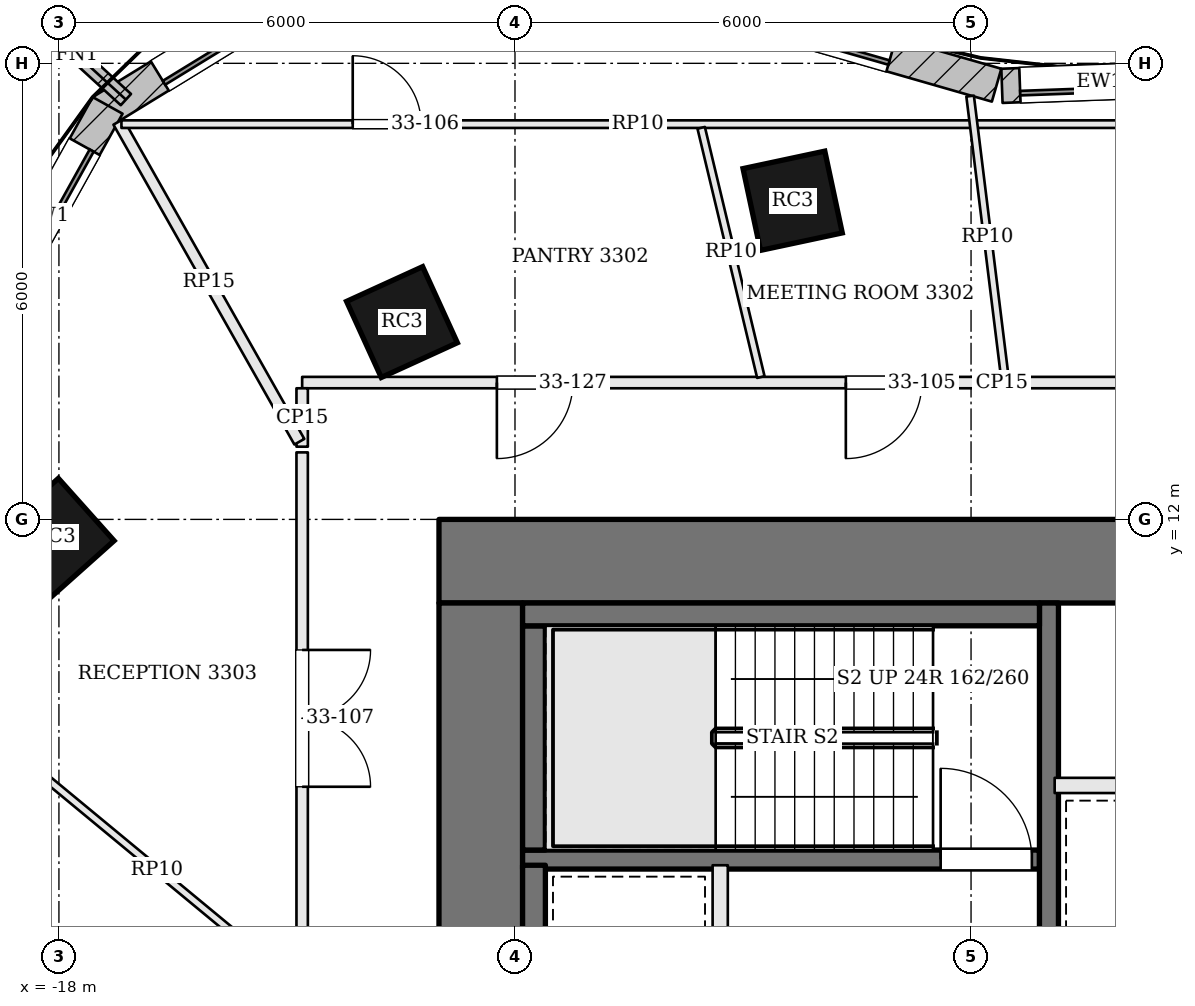
"""IFC4 building model, lengths in metres.
Left out: names, types, materials, properties, quantities, classifications, styles, units other than length and angle.
Written with IfcOpenShell. Run it as: python <this file> out.ifc"""

import sys

from ifc_helpers import new_model, si_unit, direction, frame, frame_2d, origin, origin_2d, place, context, subcontext, project, spatial, rectangle, extrude, element, fill, save


model = new_model("IFC4")
c1 = context("Model", 3, precision=1e-05, world=origin(), true_north=direction((0.0, 1.0)))
c2 = subcontext(c1, "Body", "Model", "MODEL_VIEW")
j1 = project(units=[si_unit("LENGTHUNIT", "METRE"), si_unit("PLANEANGLEUNIT", "RADIAN")], contexts=[c1])
p1 = place(None, origin())
s1 = spatial("IfcSite", under=j1, at=p1, CompositionType="ELEMENT")
p2 = place(p1, origin())
s2 = spatial("IfcBuilding", under=s1, at=p2, CompositionType="ELEMENT")
p3 = place(p2, frame((0.0, 0.0, 138.3)))
s3 = spatial("IfcBuildingStorey", under=s2, at=p3, CompositionType="ELEMENT", Elevation=138.3)
p4 = place(p3, frame((-13.0, 11.45, 0.0), z_axis=(0.0, 0.0, 1.0), x_axis=(1.0, 0.0, 0.0)))
e1 = element("IfcWall", 1, at=p4, inside=s3, PredefinedType="SHEAR", context=c2, shape_type="SweptSolid", body=[
    extrude(rectangle(XDim=26.0, YDim=1.1, at=frame_2d((13.0, 0.0))), origin(), (0.0, 0.0, 1.0), 3.9),
])
p5 = place(p4, frame((8.975, 0.0, 0.0)))
e2 = element("IfcOpeningElement", 2, at=p5, cuts=e1, PredefinedType="OPENING", context=c2, shape_type="SweptSolid", body=[
    extrude(rectangle(XDim=0.7, YDim=2.1, at=frame_2d((0.35, 1.05))), frame((0.0, 0.56, 0.0), z_axis=(0.0, -1.0, 0.0), x_axis=(1.0, 0.0, 0.0)), (0.0, 0.0, 1.0), 1.12),
])
p6 = place(p4, frame((11.425, 0.0, 0.0)))
e3 = element("IfcOpeningElement", 3, at=p6, cuts=e1, PredefinedType="OPENING", context=c2, shape_type="SweptSolid", body=[
    extrude(rectangle(XDim=0.7, YDim=2.1, at=frame_2d((0.35, 1.05))), frame((0.0, 0.56, 0.0), z_axis=(0.0, -1.0, 0.0), x_axis=(1.0, 0.0, 0.0)), (0.0, 0.0, 1.0), 1.12),
])
p7 = place(p4, frame((13.725, 0.0, 0.0)))
e4 = element("IfcOpeningElement", 4, at=p7, cuts=e1, PredefinedType="OPENING", context=c2, shape_type="SweptSolid", body=[
    extrude(rectangle(XDim=1.0, YDim=2.1, at=frame_2d((0.5, 1.05))), frame((0.0, 0.56, 0.0), z_axis=(0.0, -1.0, 0.0), x_axis=(1.0, 0.0, 0.0)), (0.0, 0.0, 1.0), 1.12),
])
p8 = place(p4, frame((16.175, 0.0, 0.0)))
e5 = element("IfcOpeningElement", 5, at=p8, cuts=e1, PredefinedType="OPENING", context=c2, shape_type="SweptSolid", body=[
    extrude(rectangle(XDim=1.0, YDim=2.1, at=frame_2d((0.5, 1.05))), frame((0.0, 0.56, 0.0), z_axis=(0.0, -1.0, 0.0), x_axis=(1.0, 0.0, 0.0)), (0.0, 0.0, 1.0), 1.12),
])
p9 = place(p3, frame((-12.45, -1.9, 0.0), z_axis=(0.0, 0.0, 1.0), x_axis=(0.0, 1.0, 0.0)))
e6 = element("IfcWall", 6, at=p9, inside=s3, PredefinedType="SHEAR", context=c2, shape_type="SweptSolid", body=[
    extrude(rectangle(XDim=12.8, YDim=1.1, at=frame_2d((6.4, 0.0))), origin(), (0.0, 0.0, 1.0), 3.9),
])
p10 = place(p9, frame((3.9, 0.0, 0.0)))
e7 = element("IfcOpeningElement", 7, at=p10, cuts=e6, PredefinedType="OPENING", context=c2, shape_type="SweptSolid", body=[
    extrude(rectangle(XDim=1.8, YDim=2.1, at=frame_2d((0.9, 1.05))), frame((0.0, 0.56, 0.0), z_axis=(0.0, -1.0, 0.0), x_axis=(1.0, 0.0, 0.0)), (0.0, 0.0, 1.0), 1.12),
])
for number, where, z_axis, x_axis in (
    (8, (-8.347, 16.192, 0.0), (0.0, 0.0, 1.0), (-0.978, -0.209, 0.0)),
    (9, (-13.487, 14.596, 0.0), (0.0, 0.0, 1.0), (-0.91, -0.415, 0.0)),
    (10, (-18.051, 11.763, 0.0), (0.0, 0.0, 1.0), (-0.746, -0.666, 0.0)),
):
    element("IfcColumn", number, at=place(p3, frame(where, z_axis=z_axis, x_axis=x_axis)), inside=s3, PredefinedType="COLUMN", context=c2, shape_type="SweptSolid", body=[
        extrude(rectangle(XDim=1.1, YDim=1.1, at=origin_2d()), origin(), (0.0, 0.0, 1.0), 3.9),
    ])
p11 = place(p3, frame((-3.022, 17.798, 0.0), z_axis=(0.0, 0.0, 1.0), x_axis=(-0.999339560591, -0.036337895349, 0.0)))
e11 = element("IfcWall", 11, at=p11, inside=s3, PredefinedType="SOLIDWALL", context=c2, shape_type="SweptSolid", body=[
    extrude(rectangle(XDim=2.573, YDim=0.45, at=frame_2d((1.287, 0.0))), origin(), (0.0, 0.0, 1.0), 3.7),
])
p12 = place(p11, frame((0.237, 0.0, 0.9)))
e12 = element("IfcOpeningElement", 12, at=p12, cuts=e11, PredefinedType="OPENING", context=c2, shape_type="SweptSolid", body=[
    extrude(rectangle(XDim=2.1, YDim=2.3, at=frame_2d((1.05, 1.15))), frame((0.0, 0.235, 0.0), z_axis=(0.0, -1.0, 0.0), x_axis=(1.0, 0.0, 0.0)), (0.0, 0.0, 1.0), 0.47),
])
p13 = place(p3, frame((-5.664, 17.713, 0.0), z_axis=(0.0, 0.0, 1.0), x_axis=(-0.961108031684, 0.276172684083, 0.0)))
e13 = element("IfcWall", 13, at=p13, inside=s3, PredefinedType="SOLIDWALL", context=c2, shape_type="SweptSolid", body=[
    extrude(rectangle(XDim=4.686, YDim=0.45, at=frame_2d((2.343, 0.0))), origin(), (0.0, 0.0, 1.0), 3.7),
])
p14 = place(p13, frame((1.443, 0.0, 0.9)))
e14 = element("IfcOpeningElement", 14, at=p14, cuts=e13, PredefinedType="OPENING", context=c2, shape_type="SweptSolid", body=[
    extrude(rectangle(XDim=1.8, YDim=2.3, at=frame_2d((0.9, 1.15))), frame((0.0, 0.235, 0.0), z_axis=(0.0, -1.0, 0.0), x_axis=(1.0, 0.0, 0.0)), (0.0, 0.0, 1.0), 0.47),
])
p15 = place(p3, frame((-14.116, 19.4, 0.0), z_axis=(0.0, 0.0, 1.0), x_axis=(-0.852622865325, -0.522526793117, 0.0)))
e15 = element("IfcWall", 15, at=p15, inside=s3, PredefinedType="SOLIDWALL", context=c2, shape_type="SweptSolid", body=[
    extrude(rectangle(XDim=3.896, YDim=0.45, at=frame_2d((1.948, 0.0))), origin(), (0.0, 0.0, 1.0), 3.7),
])
p16 = place(p15, frame((0.898, 0.0, 0.9)))
e16 = element("IfcOpeningElement", 16, at=p16, cuts=e15, PredefinedType="OPENING", context=c2, shape_type="SweptSolid", body=[
    extrude(rectangle(XDim=2.1, YDim=2.3, at=frame_2d((1.05, 1.15))), frame((0.0, 0.235, 0.0), z_axis=(0.0, -1.0, 0.0), x_axis=(1.0, 0.0, 0.0)), (0.0, 0.0, 1.0), 0.47),
])
p17 = place(p3, frame((-17.359, 17.447, 0.0), z_axis=(0.0, 0.0, 1.0), x_axis=(-0.485618126214, -0.874171056197, 0.0)))
e17 = element("IfcWall", 17, at=p17, inside=s3, PredefinedType="SOLIDWALL", context=c2, shape_type="SweptSolid", body=[
    extrude(rectangle(XDim=3.343, YDim=0.45, at=frame_2d((1.671, 0.0))), origin(), (0.0, 0.0, 1.0), 3.7),
])
p18 = place(p17, frame((0.621, 0.0, 0.9)))
e18 = element("IfcOpeningElement", 18, at=p18, cuts=e17, PredefinedType="OPENING", context=c2, shape_type="SweptSolid", body=[
    extrude(rectangle(XDim=2.1, YDim=2.3, at=frame_2d((1.05, 1.15))), frame((0.0, 0.235, 0.0), z_axis=(0.0, -1.0, 0.0), x_axis=(1.0, 0.0, 0.0)), (0.0, 0.0, 1.0), 0.47),
])
p19 = place(p3, frame((-17.119, 17.523, 0.0), z_axis=(0.0, 0.0, 1.0), x_axis=(-0.737866019047, 0.674947211221, 0.0)))
e19 = element("IfcWall", 19, at=p19, inside=s3, PredefinedType="SOLIDWALL", context=c2, shape_type="SweptSolid", body=[
    extrude(rectangle(XDim=1.75, YDim=0.2, at=frame_2d((0.875, 0.0))), origin(), (0.0, 0.0, 1.0), 3.7),
])
p20 = place(p3, frame((-11.9, 7.525, 0.0), z_axis=(0.0, 0.0, 1.0), x_axis=(1.0, 0.0, 0.0)))
e20 = element("IfcWall", 20, at=p20, inside=s3, PredefinedType="SOLIDWALL", context=c2, shape_type="SweptSolid", body=[
    extrude(rectangle(XDim=6.8, YDim=0.25, at=frame_2d((3.4, 0.0))), origin(), (0.0, 0.0, 1.0), 3.7),
])
p21 = place(p20, frame((5.5, 0.0, 0.0)))
e21 = element("IfcOpeningElement", 21, at=p21, cuts=e20, PredefinedType="OPENING", context=c2, shape_type="SweptSolid", body=[
    extrude(rectangle(XDim=1.2, YDim=2.1, at=frame_2d((0.6, 1.05))), frame((0.0, 0.135, 0.0), z_axis=(0.0, -1.0, 0.0), x_axis=(1.0, 0.0, 0.0)), (0.0, 0.0, 1.0), 0.27),
])
p22 = place(p3, frame((-9.3, 4.45, 0.0), z_axis=(0.0, 0.0, 1.0), x_axis=(0.0, 1.0, 0.0)))
e22 = element("IfcWall", 22, at=p22, inside=s3, PredefinedType="SOLIDWALL", context=c2, shape_type="SweptSolid", body=[
    extrude(rectangle(XDim=3.0, YDim=0.2, at=frame_2d((1.5, 0.0))), origin(), (0.0, 0.0, 1.0), 3.7),
])
p23 = place(p3, frame((-4.975, -1.9, 0.0), z_axis=(0.0, 0.0, 1.0), x_axis=(0.0, 1.0, 0.0)))
e23 = element("IfcWall", 23, at=p23, inside=s3, PredefinedType="SOLIDWALL", context=c2, shape_type="SweptSolid", body=[
    extrude(rectangle(XDim=12.8, YDim=0.25, at=frame_2d((6.4, 0.0))), origin(), (0.0, 0.0, 1.0), 3.7),
])
p24 = place(p23, frame((4.95, 0.0, 0.0)))
e24 = element("IfcOpeningElement", 24, at=p24, cuts=e23, PredefinedType="OPENING", context=c2, shape_type="SweptSolid", body=[
    extrude(rectangle(XDim=1.2, YDim=2.1, at=frame_2d((0.6, 1.05))), frame((0.0, 0.135, 0.0), z_axis=(0.0, -1.0, 0.0), x_axis=(1.0, 0.0, 0.0)), (0.0, 0.0, 1.0), 0.27),
])
p25 = place(p3, frame((-11.75, 4.45, 0.0), z_axis=(0.0, 0.0, 1.0), x_axis=(0.0, 1.0, 0.0)))
e25 = element("IfcWall", 25, at=p25, inside=s3, PredefinedType="SOLIDWALL", context=c2, shape_type="SweptSolid", body=[
    extrude(rectangle(XDim=3.0, YDim=0.3, at=frame_2d((1.5, 0.0))), origin(), (0.0, 0.0, 1.0), 3.7),
])
p26 = place(p3, frame((-11.75, 7.65, 0.0), z_axis=(0.0, 0.0, 1.0), x_axis=(0.0, 1.0, 0.0)))
e26 = element("IfcWall", 26, at=p26, inside=s3, PredefinedType="SOLIDWALL", context=c2, shape_type="SweptSolid", body=[
    extrude(rectangle(XDim=2.95, YDim=0.3, at=frame_2d((1.475, 0.0))), origin(), (0.0, 0.0, 1.0), 3.7),
])
p27 = place(p3, frame((-11.9, 10.75, 0.0), z_axis=(0.0, 0.0, 1.0), x_axis=(1.0, 0.0, 0.0)))
e27 = element("IfcWall", 27, at=p27, inside=s3, PredefinedType="SOLIDWALL", context=c2, shape_type="SweptSolid", body=[
    extrude(rectangle(XDim=6.8, YDim=0.3, at=frame_2d((3.4, 0.0))), origin(), (0.0, 0.0, 1.0), 3.7),
])
p28 = place(p3, frame((-4.9, 8.5, 0.0), z_axis=(0.0, 0.0, 1.0), x_axis=(1.0, 0.0, 0.0)))
e28 = element("IfcWall", 28, at=p28, inside=s3, PredefinedType="SOLIDWALL", context=c2, shape_type="SweptSolid", body=[
    extrude(rectangle(XDim=9.8, YDim=0.2, at=frame_2d((4.9, 0.0))), origin(), (0.0, 0.0, 1.0), 3.7),
])
p29 = place(p3, frame((3.012, 13.8, 0.0), z_axis=(0.0, 0.0, 1.0), x_axis=(-1.0, 0.0, 0.0)))
e29 = element("IfcWall", 29, at=p29, inside=s3, PredefinedType="PARTITIONING", context=c2, shape_type="SweptSolid", body=[
    extrude(rectangle(XDim=17.812, YDim=0.15, at=frame_2d((8.906, 0.0))), origin(), (0.0, 0.0, 1.0), 3.198),
])
p30 = place(p29, frame((3.342, 0.0, 0.0)))
e30 = element("IfcOpeningElement", 30, at=p30, cuts=e29, PredefinedType="OPENING", context=c2, shape_type="SweptSolid", body=[
    extrude(rectangle(XDim=1.8, YDim=2.1, at=frame_2d((0.9, 1.05))), frame((0.0, 0.085, 0.0), z_axis=(0.0, -1.0, 0.0), x_axis=(1.0, 0.0, 0.0)), (0.0, 0.0, 1.0), 0.17),
])
p31 = place(p29, frame((9.659, 0.0, 0.0)))
e31 = element("IfcOpeningElement", 31, at=p31, cuts=e29, PredefinedType="OPENING", context=c2, shape_type="SweptSolid", body=[
    extrude(rectangle(XDim=1.0, YDim=2.4, at=frame_2d((0.5, 1.2))), frame((0.0, 0.085, 0.0), z_axis=(0.0, -1.0, 0.0), x_axis=(1.0, 0.0, 0.0)), (0.0, 0.0, 1.0), 0.17),
])
p32 = place(p29, frame((14.25, 0.0, 0.0)))
e32 = element("IfcOpeningElement", 32, at=p32, cuts=e29, PredefinedType="OPENING", context=c2, shape_type="SweptSolid", body=[
    extrude(rectangle(XDim=1.0, YDim=2.1, at=frame_2d((0.5, 1.05))), frame((0.0, 0.085, 0.0), z_axis=(0.0, -1.0, 0.0), x_axis=(1.0, 0.0, 0.0)), (0.0, 0.0, 1.0), 0.17),
])
p33 = place(p3, frame((-14.8, 13.725, 0.0), z_axis=(0.0, 0.0, 1.0), x_axis=(0.0, -1.0, 0.0)))
e33 = element("IfcWall", 33, at=p33, inside=s3, PredefinedType="PARTITIONING", context=c2, shape_type="SweptSolid", body=[
    extrude(rectangle(XDim=0.769, YDim=0.15, at=frame_2d((0.384, 0.0))), origin(), (0.0, 0.0, 1.0), 3.198),
])
p34 = place(p3, frame((-17.218, 17.23, 0.0), z_axis=(0.0, 0.0, 1.0), x_axis=(0.492436580725, -0.870348329098, 0.0)))
e34 = element("IfcWall", 34, at=p34, inside=s3, PredefinedType="PARTITIONING", context=c2, shape_type="SweptSolid", body=[
    extrude(rectangle(XDim=4.835, YDim=0.15, at=frame_2d((2.417, 0.0))), origin(), (0.0, 0.0, 1.0), 3.198),
])
p35 = place(p3, frame((-14.8, 12.882, 0.0), z_axis=(0.0, 0.0, 1.0), x_axis=(0.0, -1.0, 0.0)))
e35 = element("IfcWall", 35, at=p35, inside=s3, PredefinedType="PARTITIONING", context=c2, shape_type="SweptSolid", body=[
    extrude(rectangle(XDim=16.652, YDim=0.15, at=frame_2d((8.326, 0.0))), origin(), (0.0, 0.0, 1.0), 3.198),
])
p36 = place(p35, frame((2.599, 0.0, 0.0)))
e36 = element("IfcOpeningElement", 36, at=p36, cuts=e35, PredefinedType="OPENING", context=c2, shape_type="SweptSolid", body=[
    extrude(rectangle(XDim=1.8, YDim=2.1, at=frame_2d((0.9, 1.05))), frame((0.0, 0.085, 0.0), z_axis=(0.0, -1.0, 0.0), x_axis=(1.0, 0.0, 0.0)), (0.0, 0.0, 1.0), 0.17),
])
p37 = place(p35, frame((9.456, 0.0, 0.0)))
e37 = element("IfcOpeningElement", 37, at=p37, cuts=e35, PredefinedType="OPENING", context=c2, shape_type="SweptSolid", body=[
    extrude(rectangle(XDim=1.0, YDim=2.4, at=frame_2d((0.5, 1.2))), frame((0.0, 0.085, 0.0), z_axis=(0.0, -1.0, 0.0), x_axis=(1.0, 0.0, 0.0)), (0.0, 0.0, 1.0), 0.17),
])
p38 = place(p35, frame((14.15, 0.0, 0.0)))
e38 = element("IfcOpeningElement", 38, at=p38, cuts=e35, PredefinedType="OPENING", context=c2, shape_type="SweptSolid", body=[
    extrude(rectangle(XDim=1.0, YDim=2.1, at=frame_2d((0.5, 1.05))), frame((0.0, 0.085, 0.0), z_axis=(0.0, -1.0, 0.0), x_axis=(1.0, 0.0, 0.0)), (0.0, 0.0, 1.0), 0.17),
])
p39 = place(p3, frame((-17.178, 17.2, 0.0), z_axis=(0.0, 0.0, 1.0), x_axis=(1.0, 0.0, 0.0)))
e39 = element("IfcWall", 39, at=p39, inside=s3, PredefinedType="PARTITIONING", context=c2, shape_type="SweptSolid", body=[
    extrude(rectangle(XDim=13.585, YDim=0.1, at=frame_2d((6.792, 0.0))), origin(), (0.0, 0.0, 1.0), 3.184),
])
p40 = place(p39, frame((3.043, 0.0, 0.0)))
e40 = element("IfcOpeningElement", 40, at=p40, cuts=e39, PredefinedType="OPENING", context=c2, shape_type="SweptSolid", body=[
    extrude(rectangle(XDim=0.9, YDim=2.1, at=frame_2d((0.45, 1.05))), frame((0.0, 0.06, 0.0), z_axis=(0.0, -1.0, 0.0), x_axis=(1.0, 0.0, 0.0)), (0.0, 0.0, 1.0), 0.12),
])
p41 = place(p3, frame((-5.556, 13.875, 0.0), z_axis=(0.0, 0.0, 1.0), x_axis=(-0.122573624649, 0.99245942312, 0.0)))
e41 = element("IfcWall", 41, at=p41, inside=s3, PredefinedType="PARTITIONING", context=c2, shape_type="SweptSolid", body=[
    extrude(rectangle(XDim=3.723, YDim=0.1, at=frame_2d((1.861, 0.0))), origin(), (0.0, 0.0, 1.0), 3.184),
])
p42 = place(p3, frame((-8.765, 13.873, 0.0), z_axis=(0.0, 0.0, 1.0), x_axis=(-0.232827854215, 0.972517963999, 0.0)))
e42 = element("IfcWall", 42, at=p42, inside=s3, PredefinedType="PARTITIONING", context=c2, shape_type="SweptSolid", body=[
    extrude(rectangle(XDim=3.371, YDim=0.1, at=frame_2d((1.686, 0.0))), origin(), (0.0, 0.0, 1.0), 3.184),
])
p43 = place(p3, frame((-14.858, 5.857, 0.0), z_axis=(0.0, 0.0, 1.0), x_axis=(-0.770605931108, 0.637311932213, 0.0)))
e43 = element("IfcWall", 43, at=p43, inside=s3, PredefinedType="PARTITIONING", context=c2, shape_type="SweptSolid", body=[
    extrude(rectangle(XDim=4.806, YDim=0.1, at=frame_2d((2.403, 0.0))), origin(), (0.0, 0.0, 1.0), 3.184),
])
p44 = place(p12, origin())
e44 = element("IfcWindow", 44, at=p44, inside=s3, PartitioningType="SINGLE_PANEL", PredefinedType="WINDOW", context=c2, shape_type="SweptSolid", body=[
    extrude(rectangle(XDim=2.1, YDim=2.3, at=frame_2d((1.05, 1.15))), frame((0.0, 0.135, 0.0), z_axis=(0.0, -1.0, 0.0), x_axis=(1.0, 0.0, 0.0)), (0.0, 0.0, 1.0), 0.06),
])
fill(e12, e44)
p45 = place(p14, origin())
e45 = element("IfcWindow", 45, at=p45, inside=s3, PartitioningType="SINGLE_PANEL", PredefinedType="WINDOW", context=c2, shape_type="SweptSolid", body=[
    extrude(rectangle(XDim=1.8, YDim=2.3, at=frame_2d((0.9, 1.15))), frame((0.0, 0.135, 0.0), z_axis=(0.0, -1.0, 0.0), x_axis=(1.0, 0.0, 0.0)), (0.0, 0.0, 1.0), 0.06),
])
fill(e14, e45)
p46 = place(p16, origin())
e46 = element("IfcWindow", 46, at=p46, inside=s3, PartitioningType="SINGLE_PANEL", PredefinedType="WINDOW", context=c2, shape_type="SweptSolid", body=[
    extrude(rectangle(XDim=2.1, YDim=2.3, at=frame_2d((1.05, 1.15))), frame((0.0, 0.135, 0.0), z_axis=(0.0, -1.0, 0.0), x_axis=(1.0, 0.0, 0.0)), (0.0, 0.0, 1.0), 0.06),
])
fill(e16, e46)
p47 = place(p18, origin())
e47 = element("IfcWindow", 47, at=p47, inside=s3, PartitioningType="SINGLE_PANEL", PredefinedType="WINDOW", context=c2, shape_type="SweptSolid", body=[
    extrude(rectangle(XDim=2.1, YDim=2.3, at=frame_2d((1.05, 1.15))), frame((0.0, 0.135, 0.0), z_axis=(0.0, -1.0, 0.0), x_axis=(1.0, 0.0, 0.0)), (0.0, 0.0, 1.0), 0.06),
])
fill(e18, e47)
p48 = place(p21, origin())
e48 = element("IfcDoor", 48, at=p48, inside=s3, OperationType="SINGLE_SWING_LEFT", PredefinedType="DOOR", context=c2, shape_type="SweptSolid", body=[
    extrude(rectangle(XDim=1.2, YDim=2.1, at=frame_2d((0.6, 1.05))), frame((0.0, 0.025, 0.0), z_axis=(0.0, -1.0, 0.0), x_axis=(1.0, 0.0, 0.0)), (0.0, 0.0, 1.0), 0.05),
])
fill(e21, e48)
p49 = place(p31, origin())
e49 = element("IfcDoor", 49, at=p49, inside=s3, OperationType="SINGLE_SWING_RIGHT", PredefinedType="DOOR", context=c2, shape_type="SweptSolid", body=[
    extrude(rectangle(XDim=1.0, YDim=2.4, at=frame_2d((0.5, 1.2))), frame((0.0, 0.025, 0.0), z_axis=(0.0, -1.0, 0.0), x_axis=(1.0, 0.0, 0.0)), (0.0, 0.0, 1.0), 0.05),
])
fill(e31, e49)
p50 = place(p40, origin())
e50 = element("IfcDoor", 50, at=p50, inside=s3, OperationType="SINGLE_SWING_LEFT", PredefinedType="DOOR", context=c2, shape_type="SweptSolid", body=[
    extrude(rectangle(XDim=0.9, YDim=2.1, at=frame_2d((0.45, 1.05))), frame((0.0, 0.025, 0.0), z_axis=(0.0, -1.0, 0.0), x_axis=(1.0, 0.0, 0.0)), (0.0, 0.0, 1.0), 0.05),
])
fill(e40, e50)
p51 = place(p36, origin())
e51 = element("IfcDoor", 51, at=p51, inside=s3, OperationType="DOUBLE_DOOR_SINGLE_SWING", PredefinedType="DOOR", context=c2, shape_type="SweptSolid", body=[
    extrude(rectangle(XDim=1.8, YDim=2.1, at=frame_2d((0.9, 1.05))), frame((0.0, 0.025, 0.0), z_axis=(0.0, -1.0, 0.0), x_axis=(1.0, 0.0, 0.0)), (0.0, 0.0, 1.0), 0.05),
])
fill(e36, e51)
p52 = place(p32, origin())
e52 = element("IfcDoor", 52, at=p52, inside=s3, OperationType="SINGLE_SWING_RIGHT", PredefinedType="DOOR", context=c2, shape_type="SweptSolid", body=[
    extrude(rectangle(XDim=1.0, YDim=2.1, at=frame_2d((0.5, 1.05))), frame((0.0, 0.025, 0.0), z_axis=(0.0, -1.0, 0.0), x_axis=(1.0, 0.0, 0.0)), (0.0, 0.0, 1.0), 0.05),
])
fill(e32, e52)
save(model, sys.argv[1])
